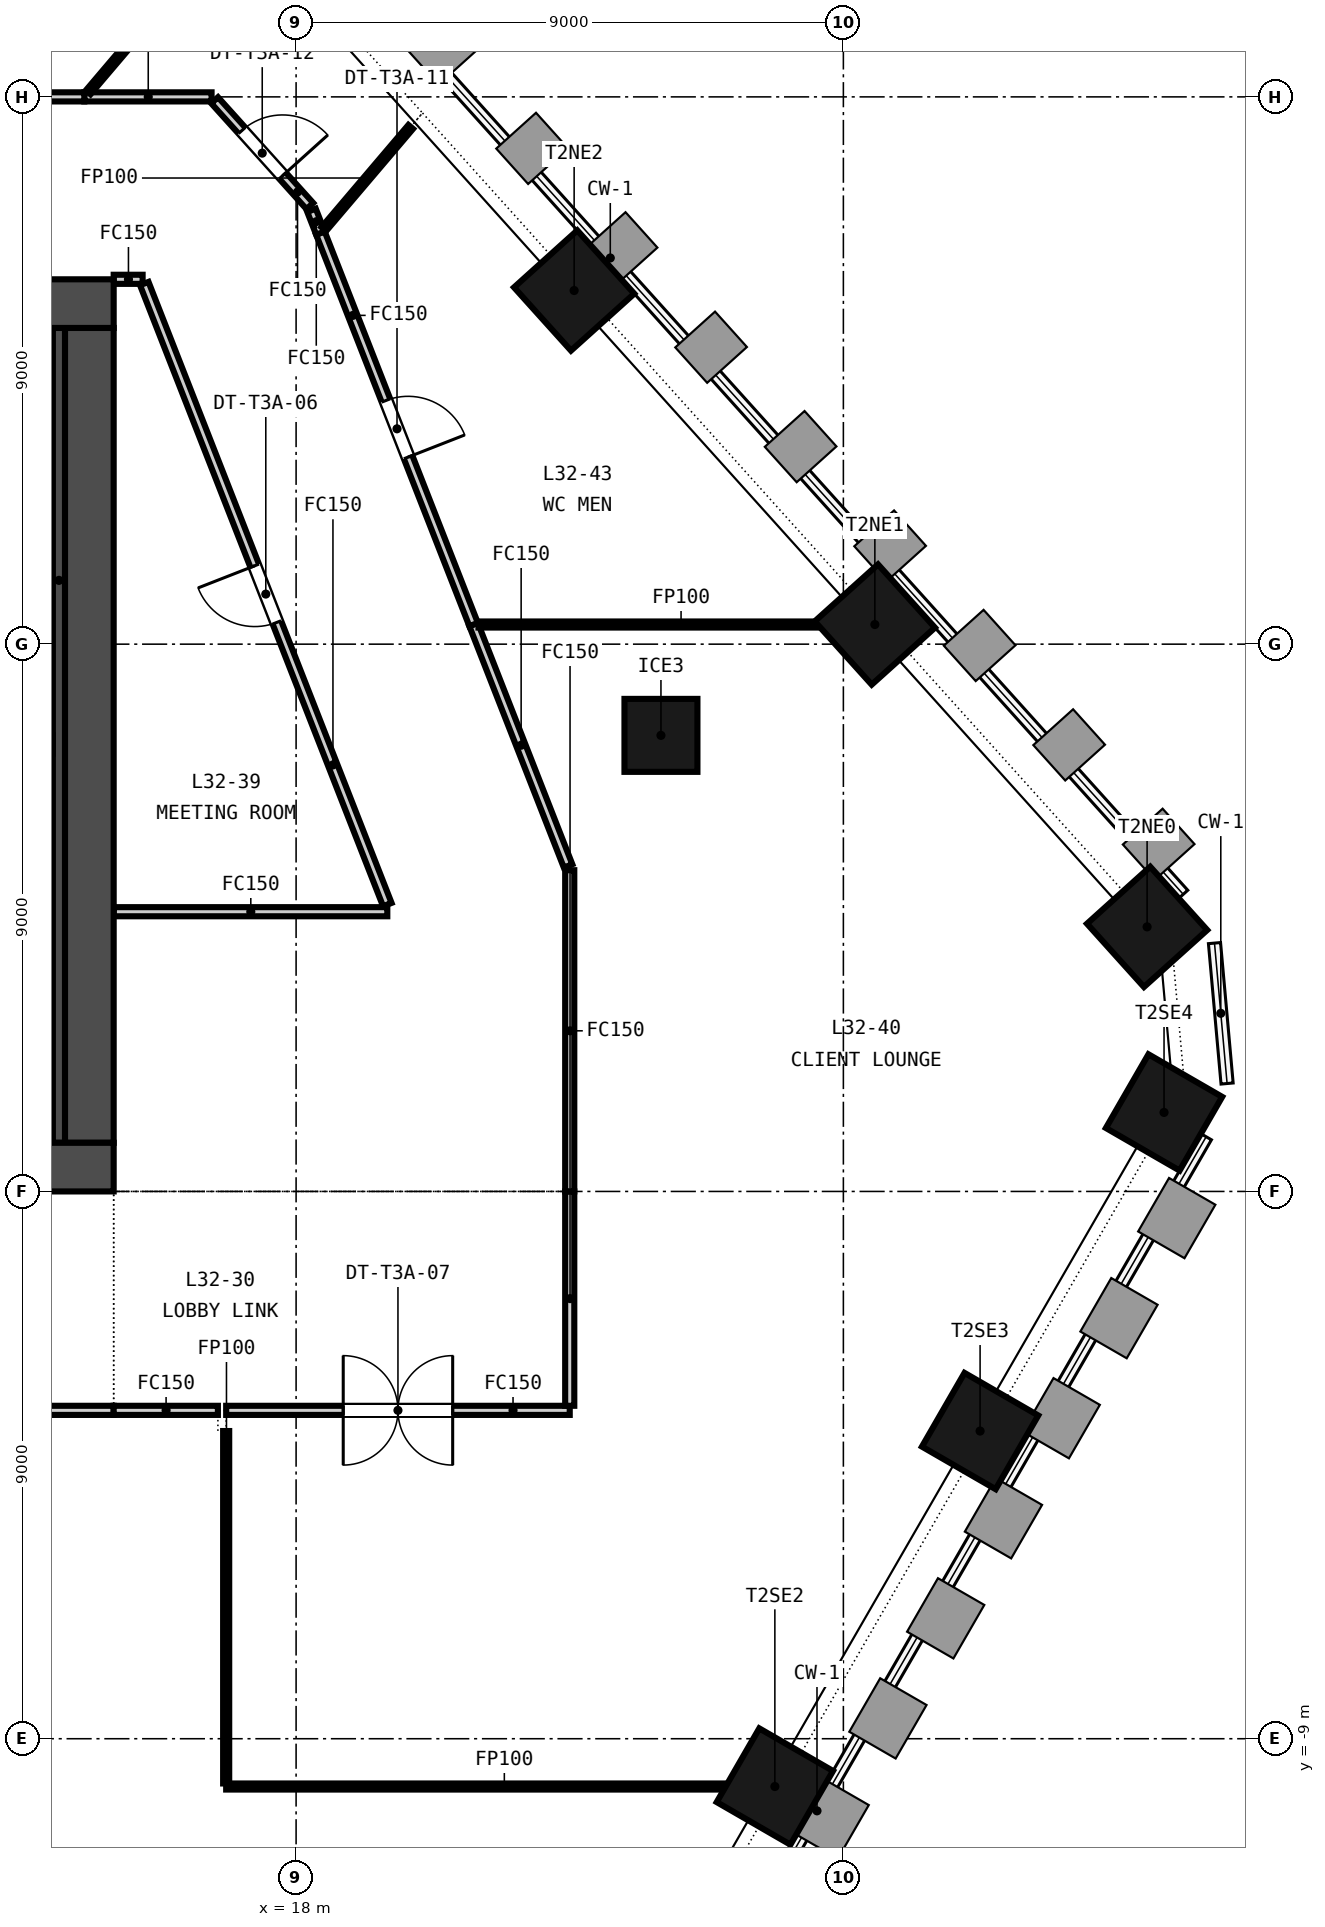
"""IFC4 building model, lengths in metres.
Left out: names, types, materials, properties, quantities, classifications, styles, units other than length and angle.
Written with IfcOpenShell. Run it as: python <this file> out.ifc"""

import sys

from ifc_helpers import new_model, si_unit, direction, frame, frame_2d, origin, origin_2d, place, context, subcontext, project, spatial, rectangle, extrude, element, fill, save


model = new_model("IFC4")
c1 = context("Model", 3, precision=1e-05, world=origin(), true_north=direction((0.0, 1.0)))
c2 = subcontext(c1, "Body", "Model", "MODEL_VIEW")
j1 = project(units=[si_unit("LENGTHUNIT", "METRE"), si_unit("PLANEANGLEUNIT", "RADIAN")], contexts=[c1])
p1 = place(None, origin())
s1 = spatial("IfcSite", under=j1, at=p1, CompositionType="ELEMENT")
p2 = place(p1, origin())
s2 = spatial("IfcBuilding", under=s1, at=p2, CompositionType="ELEMENT")
p3 = place(p2, frame((0.0, 0.0, 133.45)))
s3 = spatial("IfcBuildingStorey", under=s2, at=p3, CompositionType="ELEMENT", Elevation=133.45)
p4 = place(p3, frame((-15.0, 0.4, -0.15), z_axis=(0.0, 0.0, 1.0), x_axis=(1.0, 0.0, 0.0)))
e1 = element("IfcWall", 1, at=p4, inside=s3, PredefinedType="SOLIDWALL", context=c2, shape_type="SweptSolid", body=[
    extrude(rectangle(XDim=30.0, YDim=0.8, at=frame_2d((15.0, 0.0))), origin(), (0.0, 0.0, 1.0), 3.65),
])
p5 = place(p4, frame((5.8, 0.0, 0.15)))
e2 = element("IfcOpeningElement", 2, at=p5, cuts=e1, PredefinedType="OPENING", context=c2, shape_type="SweptSolid", body=[
    extrude(rectangle(XDim=2.4, YDim=2.4, at=frame_2d((1.2, 1.2))), frame((0.0, 0.41, 0.0), z_axis=(0.0, -1.0, 0.0), x_axis=(1.0, 0.0, 0.0)), (0.0, 0.0, 1.0), 0.82),
])
p6 = place(p4, frame((13.8, 0.0, 0.15)))
e3 = element("IfcOpeningElement", 3, at=p6, cuts=e1, PredefinedType="OPENING", context=c2, shape_type="SweptSolid", body=[
    extrude(rectangle(XDim=2.4, YDim=2.4, at=frame_2d((1.2, 1.2))), frame((0.0, 0.41, 0.0), z_axis=(0.0, -1.0, 0.0), x_axis=(1.0, 0.0, 0.0)), (0.0, 0.0, 1.0), 0.82),
])
p7 = place(p4, frame((21.8, 0.0, 0.15)))
e4 = element("IfcOpeningElement", 4, at=p7, cuts=e1, PredefinedType="OPENING", context=c2, shape_type="SweptSolid", body=[
    extrude(rectangle(XDim=2.4, YDim=2.4, at=frame_2d((1.2, 1.2))), frame((0.0, 0.41, 0.0), z_axis=(0.0, -1.0, 0.0), x_axis=(1.0, 0.0, 0.0)), (0.0, 0.0, 1.0), 0.82),
])
p8 = place(p4, frame((1.5, 0.0, 0.15)))
e5 = element("IfcOpeningElement", 5, at=p8, cuts=e1, PredefinedType="OPENING", context=c2, shape_type="SweptSolid", body=[
    extrude(rectangle(XDim=1.2, YDim=2.1, at=frame_2d((0.6, 1.05))), frame((0.0, 0.41, 0.0), z_axis=(0.0, -1.0, 0.0), x_axis=(1.0, 0.0, 0.0)), (0.0, 0.0, 1.0), 0.82),
])
p9 = place(p4, frame((27.3, 0.0, 0.15)))
e6 = element("IfcOpeningElement", 6, at=p9, cuts=e1, PredefinedType="OPENING", context=c2, shape_type="SweptSolid", body=[
    extrude(rectangle(XDim=1.2, YDim=2.1, at=frame_2d((0.6, 1.05))), frame((0.0, 0.41, 0.0), z_axis=(0.0, -1.0, 0.0), x_axis=(1.0, 0.0, 0.0)), (0.0, 0.0, 1.0), 0.82),
])
p10 = place(p3, frame((-15.0, 14.6, -0.15), z_axis=(0.0, 0.0, 1.0), x_axis=(1.0, 0.0, 0.0)))
e7 = element("IfcWall", 7, at=p10, inside=s3, PredefinedType="SOLIDWALL", context=c2, shape_type="SweptSolid", body=[
    extrude(rectangle(XDim=30.0, YDim=0.8, at=frame_2d((15.0, 0.0))), origin(), (0.0, 0.0, 1.0), 3.65),
])
p11 = place(p10, frame((9.25, 0.0, 0.15)))
e8 = element("IfcOpeningElement", 8, at=p11, cuts=e7, PredefinedType="OPENING", context=c2, shape_type="SweptSolid", body=[
    extrude(rectangle(XDim=1.5, YDim=2.1, at=frame_2d((0.75, 1.05))), frame((0.0, 0.41, 0.0), z_axis=(0.0, -1.0, 0.0), x_axis=(1.0, 0.0, 0.0)), (0.0, 0.0, 1.0), 0.82),
])
p12 = place(p10, frame((19.4, 0.0, 0.15)))
e9 = element("IfcOpeningElement", 9, at=p12, cuts=e7, PredefinedType="OPENING", context=c2, shape_type="SweptSolid", body=[
    extrude(rectangle(XDim=1.5, YDim=2.1, at=frame_2d((0.75, 1.05))), frame((0.0, 0.41, 0.0), z_axis=(0.0, -1.0, 0.0), x_axis=(1.0, 0.0, 0.0)), (0.0, 0.0, 1.0), 0.82),
])
p13 = place(p10, frame((1.5, 0.0, 0.15)))
e10 = element("IfcOpeningElement", 10, at=p13, cuts=e7, PredefinedType="OPENING", context=c2, shape_type="SweptSolid", body=[
    extrude(rectangle(XDim=1.2, YDim=2.1, at=frame_2d((0.6, 1.05))), frame((0.0, 0.41, 0.0), z_axis=(0.0, -1.0, 0.0), x_axis=(1.0, 0.0, 0.0)), (0.0, 0.0, 1.0), 0.82),
])
p14 = place(p10, frame((27.3, 0.0, 0.15)))
e11 = element("IfcOpeningElement", 11, at=p14, cuts=e7, PredefinedType="OPENING", context=c2, shape_type="SweptSolid", body=[
    extrude(rectangle(XDim=1.2, YDim=2.1, at=frame_2d((0.6, 1.05))), frame((0.0, 0.41, 0.0), z_axis=(0.0, -1.0, 0.0), x_axis=(1.0, 0.0, 0.0)), (0.0, 0.0, 1.0), 0.82),
])
p15 = place(p3, frame((14.6, 0.8, -0.15), z_axis=(0.0, 0.0, 1.0), x_axis=(0.0, 1.0, 0.0)))
e12 = element("IfcWall", 12, at=p15, inside=s3, PredefinedType="SOLIDWALL", context=c2, shape_type="SweptSolid", body=[
    extrude(rectangle(XDim=13.4, YDim=0.8, at=frame_2d((6.7, 0.0))), origin(), (0.0, 0.0, 1.0), 3.65),
])
for number, where, z_axis, x_axis in (
    (13, (25.873, -9.786, -0.15), (0.0, 0.0, 1.0), (0.5, 0.866, 0.0)),
    (14, (29.248, -3.94, -0.15), (0.0, 0.0, 1.0), (0.5, 0.866, 0.0)),
    (15, (32.273, 1.299, -0.15), (0.0, 0.0, 1.0), (0.5, 0.866, 0.0)),
    (16, (31.995, 4.351, -0.15), (0.0, 0.0, 1.0), (-0.669, 0.743, 0.0)),
    (17, (27.518, 9.323, -0.15), (0.0, 0.0, 1.0), (-0.669, 0.743, 0.0)),
    (18, (22.573, 14.816, -0.15), (0.0, 0.0, 1.0), (-0.669, 0.743, 0.0)),
):
    element("IfcColumn", number, at=place(p3, frame(where, z_axis=z_axis, x_axis=x_axis)), inside=s3, PredefinedType="COLUMN", context=c2, shape_type="SweptSolid", body=[
        extrude(rectangle(XDim=1.4, YDim=1.4, at=origin_2d()), origin(), (0.0, 0.0, 1.0), 3.65),
    ])
p16 = place(p3, frame((24.0, 7.5, -0.15), z_axis=(0.0, 0.0, 1.0), x_axis=(1.0, 0.0, 0.0)))
e19 = element("IfcColumn", 19, at=p16, inside=s3, PredefinedType="COLUMN", context=c2, shape_type="SweptSolid", body=[
    extrude(rectangle(XDim=1.2, YDim=1.2, at=origin_2d()), origin(), (0.0, 0.0, 1.0), 3.65),
])
p17 = place(p3, frame((11.05, 7.35, 0.0), z_axis=(0.0, 0.0, 1.0), x_axis=(1.0, 0.0, 0.0)))
e20 = element("IfcWall", 20, at=p17, inside=s3, PredefinedType="SOLIDWALL", context=c2, shape_type="SweptSolid", body=[
    extrude(rectangle(XDim=2.95, YDim=0.3, at=frame_2d((1.475, 0.0))), origin(), (0.0, 0.0, 1.0), 3.5),
])
p18 = place(p3, frame((14.1, 0.8, 0.0), z_axis=(0.0, 0.0, 1.0), x_axis=(0.0, 1.0, 0.0)))
e21 = element("IfcWall", 21, at=p18, inside=s3, PredefinedType="SOLIDWALL", context=c2, shape_type="SweptSolid", body=[
    extrude(rectangle(XDim=13.4, YDim=0.2, at=frame_2d((6.7, 0.0))), origin(), (0.0, 0.0, 1.0), 3.5),
])
p19 = place(p3, frame((15.0, -3.6, 0.0), z_axis=(0.0, 0.0, 1.0), x_axis=(-1.0, 0.0, 0.0)))
e22 = element("IfcWall", 22, at=p19, inside=s3, PredefinedType="PARTITIONING", context=c2, shape_type="SweptSolid", body=[
    extrude(rectangle(XDim=30.0, YDim=0.15, at=frame_2d((15.0, 0.0))), origin(), (0.0, 0.0, 1.0), 2.741),
])
p20 = place(p19, frame((14.1, 0.0, 0.0)))
e23 = element("IfcOpeningElement", 23, at=p20, cuts=e22, PredefinedType="OPENING", context=c2, shape_type="SweptSolid", body=[
    extrude(rectangle(XDim=1.8, YDim=2.1, at=frame_2d((0.9, 1.05))), frame((0.0, 0.085, 0.0), z_axis=(0.0, -1.0, 0.0), x_axis=(1.0, 0.0, 0.0)), (0.0, 0.0, 1.0), 0.17),
])
p21 = place(p3, frame((22.5, -3.6, 0.0), z_axis=(0.0, 0.0, 1.0), x_axis=(-1.0, 0.0, 0.0)))
e24 = element("IfcWall", 24, at=p21, inside=s3, PredefinedType="PARTITIONING", context=c2, shape_type="SweptSolid", body=[
    extrude(rectangle(XDim=5.65, YDim=0.15, at=frame_2d((2.825, 0.0))), origin(), (0.0, 0.0, 1.0), 2.741),
])
p22 = place(p21, frame((1.925, 0.0, 0.0)))
e25 = element("IfcOpeningElement", 25, at=p22, cuts=e24, PredefinedType="OPENING", context=c2, shape_type="SweptSolid", body=[
    extrude(rectangle(XDim=1.8, YDim=2.1, at=frame_2d((0.9, 1.05))), frame((0.0, 0.085, 0.0), z_axis=(0.0, -1.0, 0.0), x_axis=(1.0, 0.0, 0.0)), (0.0, 0.0, 1.0), 0.17),
])
p23 = place(p3, frame((22.5, 0.0, 0.0), z_axis=(0.0, 0.0, 1.0), x_axis=(0.0, -1.0, 0.0)))
e26 = element("IfcWall", 26, at=p23, inside=s3, PredefinedType="PARTITIONING", context=c2, shape_type="SweptSolid", body=[
    extrude(rectangle(XDim=3.525, YDim=0.15, at=frame_2d((1.762, 0.0))), origin(), (0.0, 0.0, 1.0), 2.741),
])
p24 = place(p3, frame((16.714, -3.6, 0.0), z_axis=(0.0, 0.0, 1.0), x_axis=(-1.0, 0.0, 0.0)))
e27 = element("IfcWall", 27, at=p24, inside=s3, PredefinedType="PARTITIONING", context=c2, shape_type="SweptSolid", body=[
    extrude(rectangle(XDim=1.714, YDim=0.15, at=frame_2d((0.857, 0.0))), origin(), (0.0, 0.0, 1.0), 2.741),
])
p25 = place(p3, frame((15.476, 15.0, 0.0), z_axis=(0.0, 0.0, 1.0), x_axis=(-1.0, 0.0, 0.0)))
e28 = element("IfcWall", 28, at=p25, inside=s3, PredefinedType="PARTITIONING", context=c2, shape_type="SweptSolid", body=[
    extrude(rectangle(XDim=0.476, YDim=0.15, at=frame_2d((0.238, 0.0))), origin(), (0.0, 0.0, 1.0), 2.741),
])
p26 = place(p3, frame((19.5, 4.717, 0.0), z_axis=(0.0, 0.0, 1.0), x_axis=(-0.364410260026, 0.931238509936, 0.0)))
e29 = element("IfcWall", 29, at=p26, inside=s3, PredefinedType="PARTITIONING", context=c2, shape_type="SweptSolid", body=[
    extrude(rectangle(XDim=10.967, YDim=0.15, at=frame_2d((5.484, 0.0))), origin(), (0.0, 0.0, 1.0), 2.741),
])
p27 = place(p26, frame((4.984, 0.0, 0.0)))
e30 = element("IfcOpeningElement", 30, at=p27, cuts=e29, PredefinedType="OPENING", context=c2, shape_type="SweptSolid", body=[
    extrude(rectangle(XDim=1.0, YDim=2.1, at=frame_2d((0.5, 1.05))), frame((0.0, 0.085, 0.0), z_axis=(0.0, -1.0, 0.0), x_axis=(1.0, 0.0, 0.0)), (0.0, 0.0, 1.0), 0.17),
])
p28 = place(p3, frame((22.5, 5.283, 0.0), z_axis=(0.0, 0.0, 1.0), x_axis=(0.0, -1.0, 0.0)))
e31 = element("IfcWall", 31, at=p28, inside=s3, PredefinedType="PARTITIONING", context=c2, shape_type="SweptSolid", body=[
    extrude(rectangle(XDim=5.283, YDim=0.15, at=frame_2d((2.642, 0.0))), origin(), (0.0, 0.0, 1.0), 2.741),
])
p29 = place(p3, frame((15.0, 4.6, 0.0), z_axis=(0.0, 0.0, 1.0), x_axis=(1.0, 0.0, 0.0)))
e32 = element("IfcWall", 32, at=p29, inside=s3, PredefinedType="PARTITIONING", context=c2, shape_type="SweptSolid", body=[
    extrude(rectangle(XDim=4.5, YDim=0.15, at=frame_2d((2.25, 0.0))), origin(), (0.0, 0.0, 1.0), 2.741),
])
p30 = place(p3, frame((20.919, 9.323, 0.0), z_axis=(0.0, 0.0, 1.0), x_axis=(0.364429576393, -0.931230950865, 0.0)))
e33 = element("IfcWall", 33, at=p30, inside=s3, PredefinedType="PARTITIONING", context=c2, shape_type="SweptSolid", body=[
    extrude(rectangle(XDim=4.263, YDim=0.15, at=frame_2d((2.132, 0.0))), origin(), (0.0, 0.0, 1.0), 2.741),
])
p31 = place(p3, frame((16.85, -9.786, 0.0), z_axis=(0.0, 0.0, 1.0), x_axis=(1.0, 0.0, 0.0)))
e34 = element("IfcWall", 34, at=p31, inside=s3, PredefinedType="PARTITIONING", context=c2, shape_type="SweptSolid", body=[
    extrude(rectangle(XDim=9.139, YDim=0.1, at=frame_2d((4.569, 0.0))), origin(), (0.0, 0.0, 1.0), 2.741),
])
p32 = place(p3, frame((16.85, -9.736, 0.0), z_axis=(0.0, 0.0, 1.0), x_axis=(0.0, 1.0, 0.0)))
e35 = element("IfcWall", 35, at=p32, inside=s3, PredefinedType="PARTITIONING", context=c2, shape_type="SweptSolid", body=[
    extrude(rectangle(XDim=5.796, YDim=0.1, at=frame_2d((2.898, 0.0))), origin(), (0.0, 0.0, 1.0), 2.741),
])
p33 = place(p3, frame((18.4, 15.76, 0.0), z_axis=(0.0, 0.0, 1.0), x_axis=(0.364425982763, -0.931232357195, 0.0)))
e36 = element("IfcWall", 36, at=p33, inside=s3, PredefinedType="PARTITIONING", context=c2, shape_type="SweptSolid", body=[
    extrude(rectangle(XDim=6.912, YDim=0.15, at=frame_2d((3.456, 0.0))), origin(), (0.0, 0.0, 1.0), 2.741),
])
p34 = place(p33, frame((2.956, 0.0, 0.0)))
e37 = element("IfcOpeningElement", 37, at=p34, cuts=e36, PredefinedType="OPENING", context=c2, shape_type="SweptSolid", body=[
    extrude(rectangle(XDim=1.0, YDim=2.1, at=frame_2d((0.5, 1.05))), frame((0.0, 0.085, 0.0), z_axis=(0.0, -1.0, 0.0), x_axis=(1.0, 0.0, 0.0)), (0.0, 0.0, 1.0), 0.17),
])
p35 = place(p3, frame((21.0, 9.323, 0.0), z_axis=(0.0, 0.0, 1.0), x_axis=(1.0, 0.0, 0.0)))
e38 = element("IfcWall", 38, at=p35, inside=s3, PredefinedType="PARTITIONING", context=c2, shape_type="SweptSolid", body=[
    extrude(rectangle(XDim=6.653, YDim=0.1, at=frame_2d((3.326, 0.0))), origin(), (0.0, 0.0, 1.0), 2.741),
])
p36 = place(p3, frame((14.517, 18.0, 0.0), z_axis=(0.0, 0.0, 1.0), x_axis=(1.0, 0.0, 0.0)))
e39 = element("IfcWall", 39, at=p36, inside=s3, PredefinedType="PARTITIONING", context=c2, shape_type="SweptSolid", body=[
    extrude(rectangle(XDim=2.093, YDim=0.15, at=frame_2d((1.046, 0.0))), origin(), (0.0, 0.0, 1.0), 2.741),
])
p37 = place(p3, frame((16.66, 17.944, 0.0), z_axis=(0.0, 0.0, 1.0), x_axis=(0.669103043777, -0.743169642012, 0.0)))
e40 = element("IfcWall", 40, at=p37, inside=s3, PredefinedType="PARTITIONING", context=c2, shape_type="SweptSolid", body=[
    extrude(rectangle(XDim=2.34, YDim=0.15, at=frame_2d((1.17, 0.0))), origin(), (0.0, 0.0, 1.0), 2.741),
])
p38 = place(p37, frame((0.67, 0.0, 0.0)))
e41 = element("IfcOpeningElement", 41, at=p38, cuts=e40, PredefinedType="OPENING", context=c2, shape_type="SweptSolid", body=[
    extrude(rectangle(XDim=1.0, YDim=2.1, at=frame_2d((0.5, 1.05))), frame((0.0, 0.085, 0.0), z_axis=(0.0, -1.0, 0.0), x_axis=(1.0, 0.0, 0.0)), (0.0, 0.0, 1.0), 0.17),
])
p39 = place(p3, frame((18.253, 16.135, 0.0), z_axis=(0.0, 0.0, 1.0), x_axis=(0.36385052714, -0.93145734948, 0.0)))
e42 = element("IfcWall", 42, at=p39, inside=s3, PredefinedType="PARTITIONING", context=c2, shape_type="SweptSolid", body=[
    extrude(rectangle(XDim=0.403, YDim=0.15, at=frame_2d((0.201, 0.0))), origin(), (0.0, 0.0, 1.0), 2.741),
])
p40 = place(p3, frame((18.455, 15.825, 0.0), z_axis=(0.0, 0.0, 1.0), x_axis=(0.647780060511, 0.761827403815, 0.0)))
e43 = element("IfcWall", 43, at=p40, inside=s3, PredefinedType="PARTITIONING", context=c2, shape_type="SweptSolid", body=[
    extrude(rectangle(XDim=2.207, YDim=0.1, at=frame_2d((1.104, 0.0))), origin(), (0.0, 0.0, 1.0), 2.741),
])
p41 = place(p3, frame((8.075, 18.0, 0.0), z_axis=(0.0, 0.0, 1.0), x_axis=(1.0, 0.0, 0.0)))
e44 = element("IfcWall", 44, at=p41, inside=s3, PredefinedType="PARTITIONING", context=c2, shape_type="SweptSolid", body=[
    extrude(rectangle(XDim=6.442, YDim=0.15, at=frame_2d((3.221, 0.0))), origin(), (0.0, 0.0, 1.0), 2.741),
])
p42 = place(p41, frame((2.721, 0.0, 0.0)))
e45 = element("IfcOpeningElement", 45, at=p42, cuts=e44, PredefinedType="OPENING", context=c2, shape_type="SweptSolid", body=[
    extrude(rectangle(XDim=1.0, YDim=2.1, at=frame_2d((0.5, 1.05))), frame((0.0, 0.085, 0.0), z_axis=(0.0, -1.0, 0.0), x_axis=(1.0, 0.0, 0.0)), (0.0, 0.0, 1.0), 0.17),
])
p43 = place(p3, frame((14.581, 18.075, 0.0), z_axis=(0.0, 0.0, 1.0), x_axis=(0.6476632602, 0.761926703422, 0.0)))
e46 = element("IfcWall", 46, at=p43, inside=s3, PredefinedType="PARTITIONING", context=c2, shape_type="SweptSolid", body=[
    extrude(rectangle(XDim=2.865, YDim=0.1, at=frame_2d((1.433, 0.0))), origin(), (0.0, 0.0, 1.0), 2.741),
])
p44 = place(p27, origin())
e47 = element("IfcDoor", 47, at=p44, inside=s3, OperationType="SINGLE_SWING_RIGHT", PredefinedType="DOOR", context=c2, shape_type="SweptSolid", body=[
    extrude(rectangle(XDim=1.0, YDim=2.1, at=frame_2d((0.5, 1.05))), frame((0.0, 0.025, 0.0), z_axis=(0.0, -1.0, 0.0), x_axis=(1.0, 0.0, 0.0)), (0.0, 0.0, 1.0), 0.05),
])
fill(e30, e47)
p45 = place(p22, origin())
e48 = element("IfcDoor", 48, at=p45, inside=s3, OperationType="DOUBLE_DOOR_DOUBLE_SWING", PredefinedType="DOOR", context=c2, shape_type="SweptSolid", body=[
    extrude(rectangle(XDim=1.8, YDim=2.1, at=frame_2d((0.9, 1.05))), frame((0.0, 0.025, 0.0), z_axis=(0.0, -1.0, 0.0), x_axis=(1.0, 0.0, 0.0)), (0.0, 0.0, 1.0), 0.05),
])
fill(e25, e48)
p46 = place(p34, origin())
e49 = element("IfcDoor", 49, at=p46, inside=s3, OperationType="SINGLE_SWING_RIGHT", PredefinedType="DOOR", context=c2, shape_type="SweptSolid", body=[
    extrude(rectangle(XDim=1.0, YDim=2.1, at=frame_2d((0.5, 1.05))), frame((0.0, 0.025, 0.0), z_axis=(0.0, -1.0, 0.0), x_axis=(1.0, 0.0, 0.0)), (0.0, 0.0, 1.0), 0.05),
])
fill(e37, e49)
p47 = place(p38, origin())
e50 = element("IfcDoor", 50, at=p47, inside=s3, OperationType="SINGLE_SWING_RIGHT", PredefinedType="DOOR", context=c2, shape_type="SweptSolid", body=[
    extrude(rectangle(XDim=1.0, YDim=2.1, at=frame_2d((0.5, 1.05))), frame((0.0, 0.025, 0.0), z_axis=(0.0, -1.0, 0.0), x_axis=(1.0, 0.0, 0.0)), (0.0, 0.0, 1.0), 0.05),
])
fill(e41, e50)
save(model, sys.argv[1])
